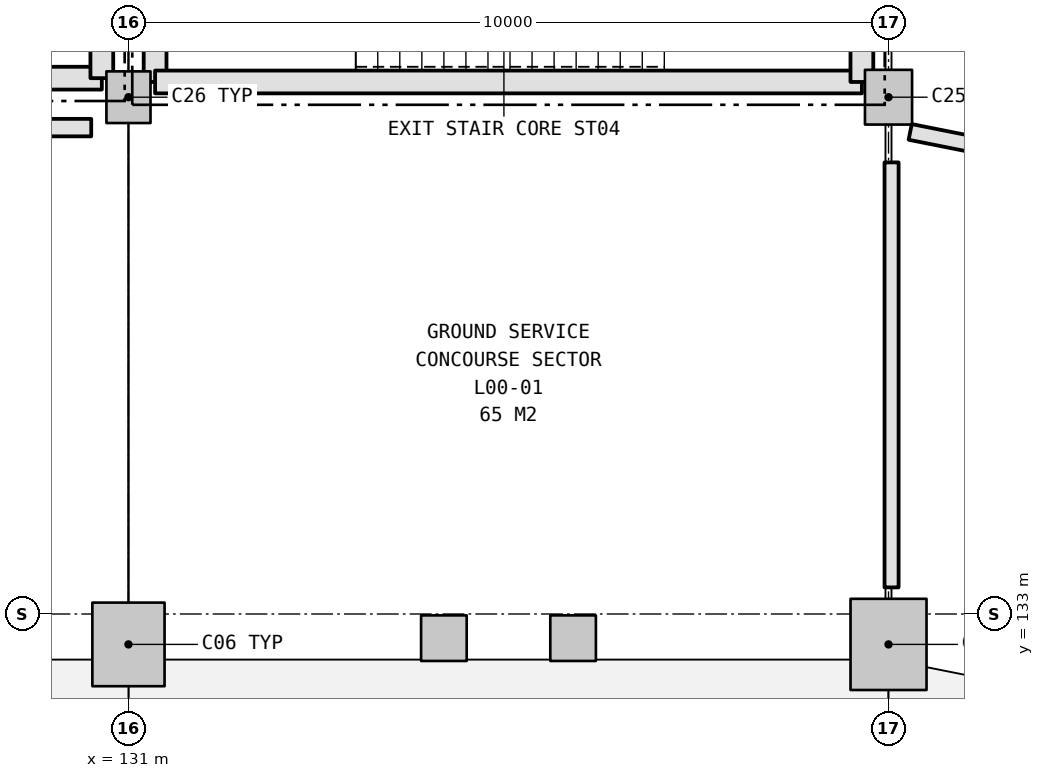
"""IFC4 building model, lengths in metres.
Left out: names, types, materials, properties, quantities, classifications, styles, units other than length and angle.
Written with IfcOpenShell. Run it as: python <this file> out.ifc"""

import sys

from ifc_helpers import new_model, si_unit, direction, frame, frame_2d, origin, origin_2d, place, context, subcontext, project, spatial, rectangle, extrude, element, save


model = new_model("IFC4")
c1 = context("Model", 3, precision=1e-05, world=origin(), true_north=direction((0.0, 1.0)))
c2 = subcontext(c1, "Body", "Model", "MODEL_VIEW")
j1 = project(units=[si_unit("LENGTHUNIT", "METRE"), si_unit("PLANEANGLEUNIT", "RADIAN")], contexts=[c1])
p1 = place(None, origin())
s1 = spatial("IfcSite", under=j1, at=p1, CompositionType="ELEMENT")
p2 = place(p1, origin())
s2 = spatial("IfcBuilding", under=s1, at=p2, CompositionType="ELEMENT")
p3 = place(p2, origin())
s3 = spatial("IfcBuildingStorey", under=s2, at=p3, CompositionType="ELEMENT", Elevation=0.0)
p4 = place(p3, frame((141.0, 132.6, 0.0), z_axis=(0.0, 0.0, 1.0), x_axis=(1.0, 0.0, 0.0)))
e1 = element("IfcColumn", 1, at=p4, inside=s3, PredefinedType="COLUMN", context=c2, shape_type="SweptSolid", body=[
    extrude(rectangle(XDim=1.0, YDim=1.2, at=origin_2d()), origin(), (0.0, 0.0, 1.0), 5.4),
])
p5 = place(p3, frame((141.0, 139.8, 0.0), z_axis=(0.0, 0.0, 1.0), x_axis=(1.0, 0.0, 0.0)))
e2 = element("IfcColumn", 2, at=p5, inside=s3, PredefinedType="COLUMN", context=c2, shape_type="SweptSolid", body=[
    extrude(rectangle(XDim=0.62, YDim=0.72, at=origin_2d()), origin(), (0.0, 0.0, 1.0), 5.4),
])
p6 = place(p3, frame((131.0, 132.6, 0.0), z_axis=(0.0, 0.0, 1.0), x_axis=(1.0, 0.0, 0.0)))
e3 = element("IfcColumn", 3, at=p6, inside=s3, PredefinedType="COLUMN", context=c2, shape_type="SweptSolid", body=[
    extrude(rectangle(XDim=0.95, YDim=1.1, at=origin_2d()), origin(), (0.0, 0.0, 1.0), 5.4),
])
p7 = place(p3, frame((131.0, 139.8, 0.0), z_axis=(0.0, 0.0, 1.0), x_axis=(1.0, 0.0, 0.0)))
e4 = element("IfcColumn", 4, at=p7, inside=s3, PredefinedType="COLUMN", context=c2, shape_type="SweptSolid", body=[
    extrude(rectangle(XDim=0.58, YDim=0.68, at=origin_2d()), origin(), (0.0, 0.0, 1.0), 5.4),
])
p8 = place(p3, frame((131.35, 145.35, 0.0), z_axis=(0.0, 0.0, 1.0), x_axis=(0.0, -1.0, 0.0)))
e5 = element("IfcWall", 5, at=p8, inside=s3, PredefinedType="SHEAR", context=c2, shape_type="SweptSolid", body=[
    extrude(rectangle(XDim=5.349, YDim=0.3, at=frame_2d((2.675, 0.0))), origin(), (0.0, 0.0, 1.0), 5.14),
])
p9 = place(p3, frame((131.35, 140.0, 0.0), z_axis=(0.0, 0.0, 1.0), x_axis=(1.0, 0.0, 0.0)))
e6 = element("IfcWall", 6, at=p9, inside=s3, PredefinedType="SHEAR", context=c2, shape_type="SweptSolid", body=[
    extrude(rectangle(XDim=9.299, YDim=0.3, at=frame_2d((4.65, 0.0))), origin(), (0.0, 0.0, 1.0), 5.14),
])
p10 = place(p3, frame((140.65, 140.0, 0.0), z_axis=(0.0, 0.0, 1.0), x_axis=(0.0, 1.0, 0.0)))
e7 = element("IfcWall", 7, at=p10, inside=s3, PredefinedType="SHEAR", context=c2, shape_type="SweptSolid", body=[
    extrude(rectangle(XDim=5.349, YDim=0.3, at=frame_2d((2.675, 0.0))), origin(), (0.0, 0.0, 1.0), 5.14),
])
p11 = place(p10, frame((1.925, 0.0, 0.0)))
e8 = element("IfcOpeningElement", 8, at=p11, cuts=e7, PredefinedType="OPENING", context=c2, shape_type="SweptSolid", body=[
    extrude(rectangle(XDim=1.5, YDim=2.2, at=frame_2d((0.75, 1.1))), frame((0.0, 0.16, 0.0), z_axis=(0.0, -1.0, 0.0), x_axis=(1.0, 0.0, 0.0)), (0.0, 0.0, 1.0), 0.32),
])
p12 = place(p3, frame((121.35, 140.05, 0.0), z_axis=(0.0, 0.0, 1.0), x_axis=(1.0, 0.0, 0.0)))
e9 = element("IfcWall", 9, at=p12, inside=s3, PredefinedType="SHEAR", context=c2, shape_type="SweptSolid", body=[
    extrude(rectangle(XDim=9.299, YDim=0.3, at=frame_2d((4.65, 0.0))), origin(), (0.0, 0.0, 1.0), 5.14),
])
p13 = place(p3, frame((130.65, 140.05, 0.0), z_axis=(0.0, 0.0, 1.0), x_axis=(0.0, 1.0, 0.0)))
e10 = element("IfcWall", 10, at=p13, inside=s3, PredefinedType="SHEAR", context=c2, shape_type="SweptSolid", body=[
    extrude(rectangle(XDim=5.349, YDim=0.3, at=frame_2d((2.675, 0.0))), origin(), (0.0, 0.0, 1.0), 5.14),
])
for number, where, z_axis, x_axis in (
    (11, (135.15, 132.682, 0.0), (0.0, 0.0, 1.0), (1.0, 0.0, 0.0)),
    (12, (136.85, 132.682, 0.0), (0.0, 0.0, 1.0), (1.0, 0.0, 0.0)),
):
    element("IfcColumn", number, at=place(p3, frame(where, z_axis=z_axis, x_axis=x_axis)), inside=s3, PredefinedType="COLUMN", context=c2, shape_type="SweptSolid", body=[
        extrude(rectangle(XDim=0.6, YDim=0.6, at=origin_2d()), origin(), (0.0, 0.0, 1.0), 5.4),
    ])
p14 = place(p3, frame((121.45, 139.4, 0.0), z_axis=(0.0, 0.0, 1.0), x_axis=(1.0, 0.0, 0.0)))
e13 = element("IfcWall", 13, at=p14, inside=s3, PredefinedType="PLUMBINGWALL", context=c2, shape_type="SweptSolid", body=[
    extrude(rectangle(XDim=9.06, YDim=0.23, at=frame_2d((4.53, 0.0))), origin(), (0.0, 0.0, 1.0), 5.12),
])
p15 = place(p3, frame((141.285, 139.343, 0.0), z_axis=(0.0, 0.0, 1.0), x_axis=(0.980784295226, -0.195095274771, 0.0)))
e14 = element("IfcWall", 14, at=p15, inside=s3, PredefinedType="PLUMBINGWALL", context=c2, shape_type="SweptSolid", body=[
    extrude(rectangle(XDim=16.742, YDim=0.21, at=frame_2d((8.371, 0.0))), origin(), (0.0, 0.0, 1.0), 4.305),
])
p16 = place(p15, frame((7.896, 0.0, 0.0)))
e15 = element("IfcOpeningElement", 15, at=p16, cuts=e14, PredefinedType="OPENING", context=c2, shape_type="SweptSolid", body=[
    extrude(rectangle(XDim=0.95, YDim=2.15, at=frame_2d((0.475, 1.075))), frame((0.0, 0.115, 0.0), z_axis=(0.0, -1.0, 0.0), x_axis=(1.0, 0.0, 0.0)), (0.0, 0.0, 1.0), 0.23),
])
p17 = place(p3, frame((141.04, 133.35, 0.0), z_axis=(0.0, 0.0, 1.0), x_axis=(0.0, 1.0, 0.0)))
e16 = element("IfcWall", 16, at=p17, inside=s3, PredefinedType="PARTITIONING", context=c2, shape_type="SweptSolid", body=[
    extrude(rectangle(XDim=5.592, YDim=0.185, at=frame_2d((2.796, 0.0))), origin(), (0.0, 0.0, 1.0), 4.305),
])
save(model, sys.argv[1])
